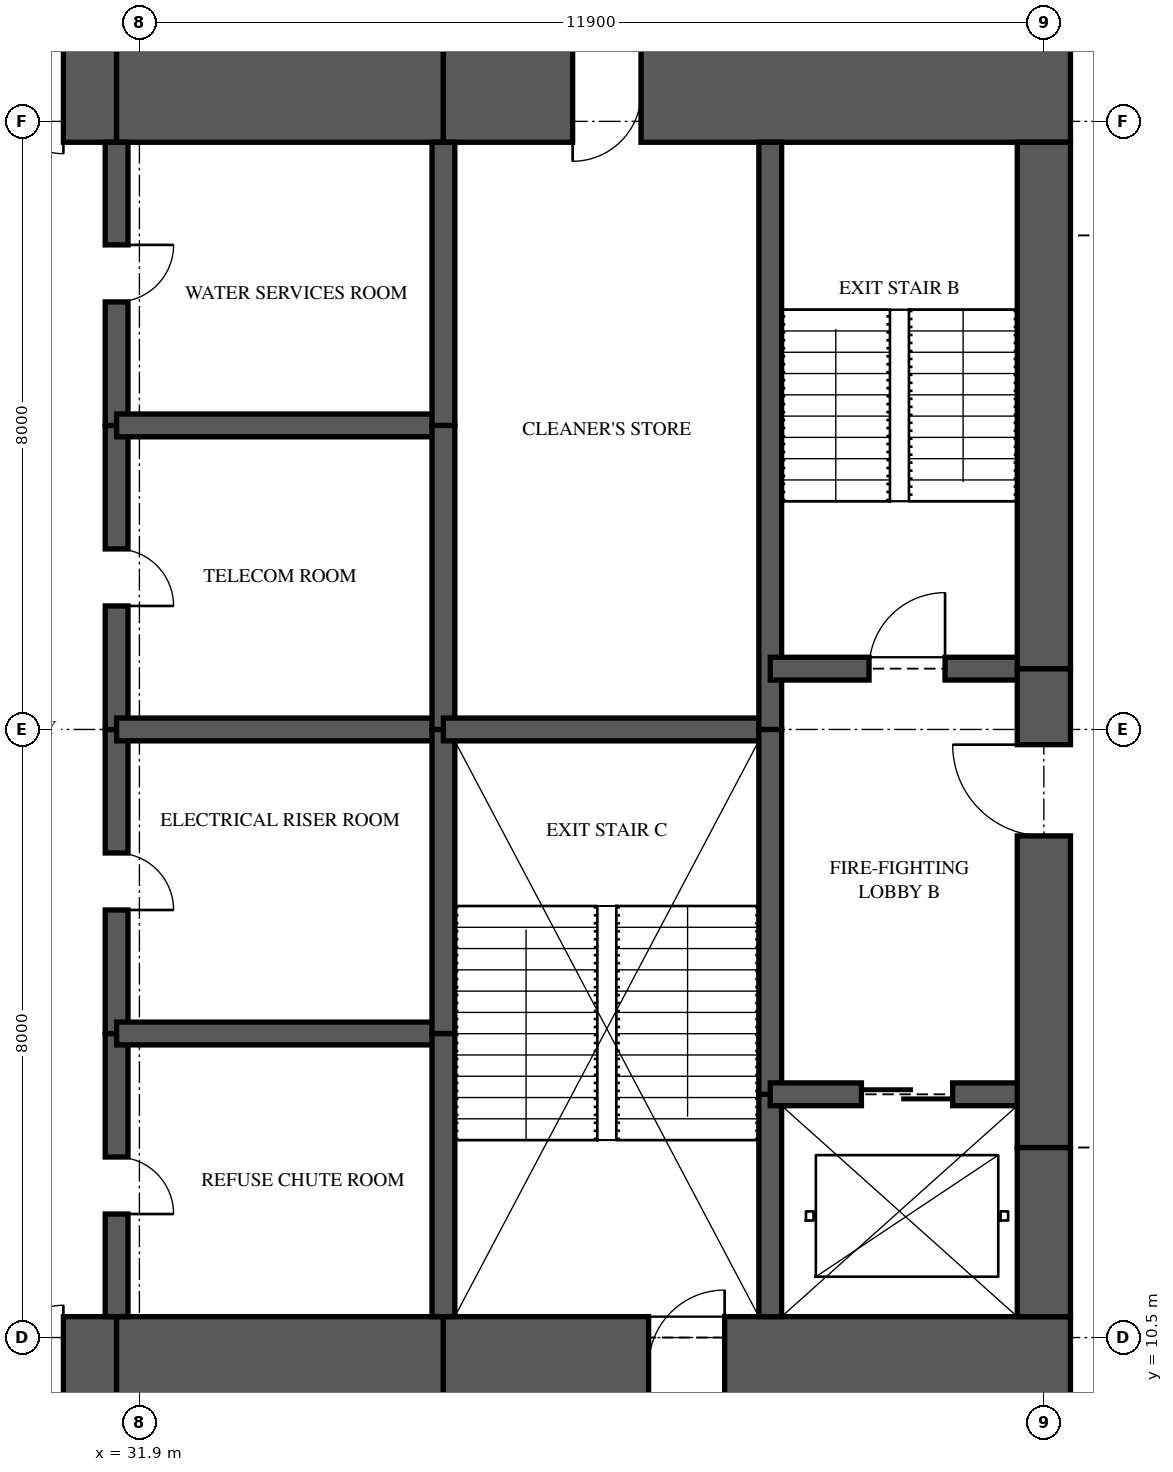
"""IFC4 building model, lengths in metres.
Left out: names, types, materials, properties, quantities, classifications, styles, units other than length and angle.
Written with IfcOpenShell. Run it as: python <this file> out.ifc"""

import sys

from ifc_helpers import new_model, si_unit, direction, frame, frame_2d, origin, place, context, subcontext, project, spatial, rectangle, extrude, element, fill, save


model = new_model("IFC4")
c1 = context("Model", 3, precision=1e-05, world=origin(), true_north=direction((0.0, 1.0)))
c2 = subcontext(c1, "Body", "Model", "MODEL_VIEW")
j1 = project(units=[si_unit("LENGTHUNIT", "METRE"), si_unit("PLANEANGLEUNIT", "RADIAN")], contexts=[c1])
p1 = place(None, origin())
s1 = spatial("IfcSite", under=j1, at=p1, CompositionType="ELEMENT")
p2 = place(p1, origin())
s2 = spatial("IfcBuilding", under=s1, at=p2, CompositionType="ELEMENT")
p3 = place(p2, frame((0.0, 0.0, 174.45)))
s3 = spatial("IfcBuildingStorey", under=s2, at=p3, CompositionType="ELEMENT", Elevation=174.45)
p4 = place(p3, frame((26.0, 10.125, 0.0), z_axis=(0.0, 0.0, 1.0), x_axis=(1.0, 0.0, 0.0)))
e1 = element("IfcWall", 1, at=p4, inside=s3, PredefinedType="SHEAR", context=c2, shape_type="SweptSolid", body=[
    extrude(rectangle(XDim=5.6, YDim=1.3, at=frame_2d((2.8, 0.0))), origin(), (0.0, 0.0, 1.0), 3.35),
])
p5 = place(p4, frame((3.3, 0.0, 0.0)))
e2 = element("IfcOpeningElement", 2, at=p5, cuts=e1, PredefinedType="OPENING", context=c2, shape_type="SweptSolid", body=[
    extrude(rectangle(XDim=1.6, YDim=2.1, at=frame_2d((0.8, 1.05))), frame((0.0, 0.66, 0.0), z_axis=(0.0, -1.0, 0.0), x_axis=(1.0, 0.0, 0.0)), (0.0, 0.0, 1.0), 1.32),
])
p6 = place(p3, frame((31.6, 10.125, 0.0), z_axis=(0.0, 0.0, 1.0), x_axis=(1.0, 0.0, 0.0)))
e3 = element("IfcWall", 3, at=p6, inside=s3, PredefinedType="SHEAR", context=c2, shape_type="SweptSolid", body=[
    extrude(rectangle(XDim=4.3, YDim=1.3, at=frame_2d((2.15, 0.0))), origin(), (0.0, 0.0, 1.0), 3.35),
])
p7 = place(p3, frame((35.9, 10.125, 0.0), z_axis=(0.0, 0.0, 1.0), x_axis=(1.0, 0.0, 0.0)))
e4 = element("IfcWall", 4, at=p7, inside=s3, PredefinedType="SHEAR", context=c2, shape_type="SweptSolid", body=[
    extrude(rectangle(XDim=8.25, YDim=1.3, at=frame_2d((4.125, 0.0))), origin(), (0.0, 0.0, 1.0), 3.35),
])
p8 = place(p7, frame((2.7, 0.0, 0.0)))
e5 = element("IfcOpeningElement", 5, at=p8, cuts=e4, PredefinedType="OPENING", context=c2, shape_type="SweptSolid", body=[
    extrude(rectangle(XDim=1.0, YDim=2.1, at=frame_2d((0.5, 1.05))), frame((0.0, 0.66, 0.0), z_axis=(0.0, -1.0, 0.0), x_axis=(1.0, 0.0, 0.0)), (0.0, 0.0, 1.0), 1.32),
])
p9 = place(p3, frame((44.15, 26.875, 0.0), z_axis=(0.0, 0.0, 1.0), x_axis=(-1.0, 0.0, 0.0)))
e6 = element("IfcWall", 6, at=p9, inside=s3, PredefinedType="SHEAR", context=c2, shape_type="SweptSolid", body=[
    extrude(rectangle(XDim=8.25, YDim=1.3, at=frame_2d((4.125, 0.0))), origin(), (0.0, 0.0, 1.0), 3.35),
])
p10 = place(p9, frame((5.65, 0.0, 0.0)))
e7 = element("IfcOpeningElement", 7, at=p10, cuts=e6, PredefinedType="OPENING", context=c2, shape_type="SweptSolid", body=[
    extrude(rectangle(XDim=0.9, YDim=2.1, at=frame_2d((0.45, 1.05))), frame((0.0, 0.66, 0.0), z_axis=(0.0, -1.0, 0.0), x_axis=(1.0, 0.0, 0.0)), (0.0, 0.0, 1.0), 1.32),
])
p11 = place(p3, frame((35.9, 26.875, 0.0), z_axis=(0.0, 0.0, 1.0), x_axis=(-1.0, 0.0, 0.0)))
e8 = element("IfcWall", 8, at=p11, inside=s3, PredefinedType="SHEAR", context=c2, shape_type="SweptSolid", body=[
    extrude(rectangle(XDim=4.3, YDim=1.3, at=frame_2d((2.15, 0.0))), origin(), (0.0, 0.0, 1.0), 3.35),
])
p12 = place(p3, frame((31.6, 26.875, 0.0), z_axis=(0.0, 0.0, 1.0), x_axis=(-1.0, 0.0, 0.0)))
e9 = element("IfcWall", 9, at=p12, inside=s3, PredefinedType="SHEAR", context=c2, shape_type="SweptSolid", body=[
    extrude(rectangle(XDim=5.6, YDim=1.3, at=frame_2d((2.8, 0.0))), origin(), (0.0, 0.0, 1.0), 3.35),
])
p13 = place(p12, frame((0.7, 0.0, 0.0)))
e10 = element("IfcOpeningElement", 10, at=p13, cuts=e9, PredefinedType="OPENING", context=c2, shape_type="SweptSolid", body=[
    extrude(rectangle(XDim=1.6, YDim=2.1, at=frame_2d((0.8, 1.05))), frame((0.0, 0.66, 0.0), z_axis=(0.0, -1.0, 0.0), x_axis=(1.0, 0.0, 0.0)), (0.0, 0.0, 1.0), 1.32),
])
p14 = place(p3, frame((43.8, 10.775, 0.0), z_axis=(0.0, 0.0, 1.0), x_axis=(0.0, 1.0, 0.0)))
e11 = element("IfcWall", 11, at=p14, inside=s3, PredefinedType="SHEAR", context=c2, shape_type="SweptSolid", body=[
    extrude(rectangle(XDim=2.225, YDim=0.7, at=frame_2d((1.113, 0.0))), origin(), (0.0, 0.0, 1.0), 3.35),
])
p15 = place(p3, frame((43.8, 13.0, 0.0), z_axis=(0.0, 0.0, 1.0), x_axis=(0.0, 1.0, 0.0)))
e12 = element("IfcWall", 12, at=p15, inside=s3, PredefinedType="SHEAR", context=c2, shape_type="SweptSolid", body=[
    extrude(rectangle(XDim=6.3, YDim=0.7, at=frame_2d((3.15, 0.0))), origin(), (0.0, 0.0, 1.0), 3.35),
])
p16 = place(p15, frame((4.1, 0.0, 0.0)))
e13 = element("IfcOpeningElement", 13, at=p16, cuts=e12, PredefinedType="OPENING", context=c2, shape_type="SweptSolid", body=[
    extrude(rectangle(XDim=1.2, YDim=2.2, at=frame_2d((0.6, 1.1))), frame((0.0, 0.36, 0.0), z_axis=(0.0, -1.0, 0.0), x_axis=(1.0, 0.0, 0.0)), (0.0, 0.0, 1.0), 0.72),
])
p17 = place(p3, frame((43.8, 19.3, 0.0), z_axis=(0.0, 0.0, 1.0), x_axis=(0.0, 1.0, 0.0)))
e14 = element("IfcWall", 14, at=p17, inside=s3, PredefinedType="SHEAR", context=c2, shape_type="SweptSolid", body=[
    extrude(rectangle(XDim=6.925, YDim=0.7, at=frame_2d((3.462, 0.0))), origin(), (0.0, 0.0, 1.0), 3.35),
])
p18 = place(p3, frame((31.6, 10.775, 0.0), z_axis=(0.0, 0.0, 1.0), x_axis=(0.0, 1.0, 0.0)))
e15 = element("IfcWall", 15, at=p18, inside=s3, PredefinedType="SHEAR", context=c2, shape_type="SweptSolid", body=[
    extrude(rectangle(XDim=3.725, YDim=0.3, at=frame_2d((1.863, 0.0))), origin(), (0.0, 0.0, 1.0), 3.35),
])
p19 = place(p18, frame((1.35, 0.0, 0.0)))
e16 = element("IfcOpeningElement", 16, at=p19, cuts=e15, PredefinedType="OPENING", context=c2, shape_type="SweptSolid", body=[
    extrude(rectangle(XDim=0.75, YDim=2.1, at=frame_2d((0.375, 1.05))), frame((0.0, 0.16, 0.0), z_axis=(0.0, -1.0, 0.0), x_axis=(1.0, 0.0, 0.0)), (0.0, 0.0, 1.0), 0.32),
])
p20 = place(p3, frame((31.6, 14.5, 0.0), z_axis=(0.0, 0.0, 1.0), x_axis=(0.0, 1.0, 0.0)))
e17 = element("IfcWall", 17, at=p20, inside=s3, PredefinedType="SHEAR", context=c2, shape_type="SweptSolid", body=[
    extrude(rectangle(XDim=4.0, YDim=0.3, at=frame_2d((2.0, 0.0))), origin(), (0.0, 0.0, 1.0), 3.35),
])
p21 = place(p20, frame((1.625, 0.0, 0.0)))
e18 = element("IfcOpeningElement", 18, at=p21, cuts=e17, PredefinedType="OPENING", context=c2, shape_type="SweptSolid", body=[
    extrude(rectangle(XDim=0.75, YDim=2.1, at=frame_2d((0.375, 1.05))), frame((0.0, 0.16, 0.0), z_axis=(0.0, -1.0, 0.0), x_axis=(1.0, 0.0, 0.0)), (0.0, 0.0, 1.0), 0.32),
])
p22 = place(p3, frame((31.6, 18.5, 0.0), z_axis=(0.0, 0.0, 1.0), x_axis=(0.0, 1.0, 0.0)))
e19 = element("IfcWall", 19, at=p22, inside=s3, PredefinedType="SHEAR", context=c2, shape_type="SweptSolid", body=[
    extrude(rectangle(XDim=4.0, YDim=0.3, at=frame_2d((2.0, 0.0))), origin(), (0.0, 0.0, 1.0), 3.35),
])
p23 = place(p22, frame((1.625, 0.0, 0.0)))
e20 = element("IfcOpeningElement", 20, at=p23, cuts=e19, PredefinedType="OPENING", context=c2, shape_type="SweptSolid", body=[
    extrude(rectangle(XDim=0.75, YDim=2.1, at=frame_2d((0.375, 1.05))), frame((0.0, 0.16, 0.0), z_axis=(0.0, -1.0, 0.0), x_axis=(1.0, 0.0, 0.0)), (0.0, 0.0, 1.0), 0.32),
])
p24 = place(p3, frame((31.6, 22.5, 0.0), z_axis=(0.0, 0.0, 1.0), x_axis=(0.0, 1.0, 0.0)))
e21 = element("IfcWall", 21, at=p24, inside=s3, PredefinedType="SHEAR", context=c2, shape_type="SweptSolid", body=[
    extrude(rectangle(XDim=3.725, YDim=0.3, at=frame_2d((1.863, 0.0))), origin(), (0.0, 0.0, 1.0), 3.35),
])
p25 = place(p24, frame((1.625, 0.0, 0.0)))
e22 = element("IfcOpeningElement", 22, at=p25, cuts=e21, PredefinedType="OPENING", context=c2, shape_type="SweptSolid", body=[
    extrude(rectangle(XDim=0.75, YDim=2.1, at=frame_2d((0.375, 1.05))), frame((0.0, 0.16, 0.0), z_axis=(0.0, -1.0, 0.0), x_axis=(1.0, 0.0, 0.0)), (0.0, 0.0, 1.0), 0.32),
])
p26 = place(p3, frame((35.9, 10.775, 0.0), z_axis=(0.0, 0.0, 1.0), x_axis=(0.0, 1.0, 0.0)))
e23 = element("IfcWall", 23, at=p26, inside=s3, PredefinedType="SHEAR", context=c2, shape_type="SweptSolid", body=[
    extrude(rectangle(XDim=3.725, YDim=0.3, at=frame_2d((1.863, 0.0))), origin(), (0.0, 0.0, 1.0), 3.35),
])
for number, where, z_axis, x_axis in (
    (24, (35.9, 14.5, 0.0), (0.0, 0.0, 1.0), (0.0, 1.0, 0.0)),
    (25, (35.9, 18.5, 0.0), (0.0, 0.0, 1.0), (0.0, 1.0, 0.0)),
):
    element("IfcWall", number, at=place(p3, frame(where, z_axis=z_axis, x_axis=x_axis)), inside=s3, PredefinedType="SHEAR", context=c2, shape_type="SweptSolid", body=[
        extrude(rectangle(XDim=4.0, YDim=0.3, at=frame_2d((2.0, 0.0))), origin(), (0.0, 0.0, 1.0), 3.35),
    ])
p27 = place(p3, frame((35.9, 22.5, 0.0), z_axis=(0.0, 0.0, 1.0), x_axis=(0.0, 1.0, 0.0)))
e26 = element("IfcWall", 26, at=p27, inside=s3, PredefinedType="SHEAR", context=c2, shape_type="SweptSolid", body=[
    extrude(rectangle(XDim=3.725, YDim=0.3, at=frame_2d((1.863, 0.0))), origin(), (0.0, 0.0, 1.0), 3.35),
])
p28 = place(p3, frame((40.2, 10.775, 0.0), z_axis=(0.0, 0.0, 1.0), x_axis=(0.0, 1.0, 0.0)))
e27 = element("IfcWall", 27, at=p28, inside=s3, PredefinedType="SHEAR", context=c2, shape_type="SweptSolid", body=[
    extrude(rectangle(XDim=2.925, YDim=0.3, at=frame_2d((1.462, 0.0))), origin(), (0.0, 0.0, 1.0), 3.35),
])
p29 = place(p3, frame((40.2, 13.7, 0.0), z_axis=(0.0, 0.0, 1.0), x_axis=(0.0, 1.0, 0.0)))
e28 = element("IfcWall", 28, at=p29, inside=s3, PredefinedType="SHEAR", context=c2, shape_type="SweptSolid", body=[
    extrude(rectangle(XDim=4.8, YDim=0.3, at=frame_2d((2.4, 0.0))), origin(), (0.0, 0.0, 1.0), 3.35),
])
p30 = place(p3, frame((40.2, 18.5, 0.0), z_axis=(0.0, 0.0, 1.0), x_axis=(0.0, 1.0, 0.0)))
e29 = element("IfcWall", 29, at=p30, inside=s3, PredefinedType="SHEAR", context=c2, shape_type="SweptSolid", body=[
    extrude(rectangle(XDim=7.725, YDim=0.3, at=frame_2d((3.863, 0.0))), origin(), (0.0, 0.0, 1.0), 3.35),
])
for number, where, z_axis, x_axis in (
    (30, (31.6, 14.5, 0.0), (0.0, 0.0, 1.0), (1.0, 0.0, 0.0)),
    (31, (31.6, 18.5, 0.0), (0.0, 0.0, 1.0), (1.0, 0.0, 0.0)),
    (32, (31.6, 22.5, 0.0), (0.0, 0.0, 1.0), (1.0, 0.0, 0.0)),
):
    element("IfcWall", number, at=place(p3, frame(where, z_axis=z_axis, x_axis=x_axis)), inside=s3, PredefinedType="SHEAR", context=c2, shape_type="SweptSolid", body=[
        extrude(rectangle(XDim=4.3, YDim=0.3, at=frame_2d((2.15, 0.0))), origin(), (0.0, 0.0, 1.0), 3.35),
    ])
p31 = place(p3, frame((35.9, 18.5, 0.0), z_axis=(0.0, 0.0, 1.0), x_axis=(1.0, 0.0, 0.0)))
e33 = element("IfcWall", 33, at=p31, inside=s3, PredefinedType="SHEAR", context=c2, shape_type="SweptSolid", body=[
    extrude(rectangle(XDim=4.3, YDim=0.3, at=frame_2d((2.15, 0.0))), origin(), (0.0, 0.0, 1.0), 3.35),
])
p32 = place(p3, frame((40.2, 13.7, 0.0), z_axis=(0.0, 0.0, 1.0), x_axis=(1.0, 0.0, 0.0)))
e34 = element("IfcWall", 34, at=p32, inside=s3, PredefinedType="SHEAR", context=c2, shape_type="SweptSolid", body=[
    extrude(rectangle(XDim=3.6, YDim=0.3, at=frame_2d((1.8, 0.0))), origin(), (0.0, 0.0, 1.0), 3.35),
])
p33 = place(p32, frame((1.2, 0.0, 0.0)))
e35 = element("IfcOpeningElement", 35, at=p33, cuts=e34, PredefinedType="OPENING", context=c2, shape_type="SweptSolid", body=[
    extrude(rectangle(XDim=1.2, YDim=2.1, at=frame_2d((0.6, 1.05))), frame((0.0, 0.16, 0.0), z_axis=(0.0, -1.0, 0.0), x_axis=(1.0, 0.0, 0.0)), (0.0, 0.0, 1.0), 0.32),
])
p34 = place(p3, frame((40.2, 19.3, 0.0), z_axis=(0.0, 0.0, 1.0), x_axis=(1.0, 0.0, 0.0)))
e36 = element("IfcWall", 36, at=p34, inside=s3, PredefinedType="SHEAR", context=c2, shape_type="SweptSolid", body=[
    extrude(rectangle(XDim=3.6, YDim=0.3, at=frame_2d((1.8, 0.0))), origin(), (0.0, 0.0, 1.0), 3.35),
])
p35 = place(p34, frame((1.3, 0.0, 0.0)))
e37 = element("IfcOpeningElement", 37, at=p35, cuts=e36, PredefinedType="OPENING", context=c2, shape_type="SweptSolid", body=[
    extrude(rectangle(XDim=1.0, YDim=2.1, at=frame_2d((0.5, 1.05))), frame((0.0, 0.16, 0.0), z_axis=(0.0, -1.0, 0.0), x_axis=(1.0, 0.0, 0.0)), (0.0, 0.0, 1.0), 0.32),
])
p36 = place(p35, origin())
e38 = element("IfcDoor", 38, at=p36, inside=s3, OperationType="SINGLE_SWING_RIGHT", PredefinedType="DOOR", context=c2, shape_type="SweptSolid", body=[
    extrude(rectangle(XDim=1.0, YDim=2.1, at=frame_2d((0.5, 1.05))), frame((0.0, 0.025, 0.0), z_axis=(0.0, -1.0, 0.0), x_axis=(1.0, 0.0, 0.0)), (0.0, 0.0, 1.0), 0.05),
])
fill(e37, e38)
p37 = place(p16, origin())
e39 = element("IfcDoor", 39, at=p37, inside=s3, OperationType="SINGLE_SWING_RIGHT", PredefinedType="DOOR", context=c2, shape_type="SweptSolid", body=[
    extrude(rectangle(XDim=1.2, YDim=2.2, at=frame_2d((0.6, 1.1))), frame((0.0, 0.025, 0.0), z_axis=(0.0, -1.0, 0.0), x_axis=(1.0, 0.0, 0.0)), (0.0, 0.0, 1.0), 0.05),
])
fill(e13, e39)
p38 = place(p33, origin())
e40 = element("IfcDoor", 40, at=p38, inside=s3, OperationType="SLIDING_TO_LEFT", PredefinedType="DOOR", context=c2, shape_type="SweptSolid", body=[
    extrude(rectangle(XDim=1.2, YDim=2.1, at=frame_2d((0.6, 1.05))), frame((0.0, 0.025, 0.0), z_axis=(0.0, -1.0, 0.0), x_axis=(1.0, 0.0, 0.0)), (0.0, 0.0, 1.0), 0.05),
])
fill(e35, e40)
p39 = place(p5, origin())
e41 = element("IfcDoor", 41, at=p39, inside=s3, OperationType="DOUBLE_DOOR_SINGLE_SWING", PredefinedType="DOOR", context=c2, shape_type="SweptSolid", body=[
    extrude(rectangle(XDim=1.6, YDim=2.1, at=frame_2d((0.8, 1.05))), frame((0.0, 0.025, 0.0), z_axis=(0.0, -1.0, 0.0), x_axis=(1.0, 0.0, 0.0)), (0.0, 0.0, 1.0), 0.05),
])
fill(e2, e41)
p40 = place(p13, origin())
e42 = element("IfcDoor", 42, at=p40, inside=s3, OperationType="DOUBLE_DOOR_SINGLE_SWING", PredefinedType="DOOR", context=c2, shape_type="SweptSolid", body=[
    extrude(rectangle(XDim=1.6, YDim=2.1, at=frame_2d((0.8, 1.05))), frame((0.0, 0.025, 0.0), z_axis=(0.0, -1.0, 0.0), x_axis=(1.0, 0.0, 0.0)), (0.0, 0.0, 1.0), 0.05),
])
fill(e10, e42)
p41 = place(p19, frame((0.75, 0.0, 0.0), z_axis=(0.0, 0.0, 1.0), x_axis=(-1.0, 0.0, 0.0)))
e43 = element("IfcDoor", 43, at=p41, inside=s3, OperationType="SINGLE_SWING_RIGHT", PredefinedType="DOOR", context=c2, shape_type="SweptSolid", body=[
    extrude(rectangle(XDim=0.75, YDim=2.1, at=frame_2d((0.375, 1.05))), frame((0.0, 0.025, 0.0), z_axis=(0.0, -1.0, 0.0), x_axis=(1.0, 0.0, 0.0)), (0.0, 0.0, 1.0), 0.05),
])
fill(e16, e43)
p42 = place(p21, frame((0.75, 0.0, 0.0), z_axis=(0.0, 0.0, 1.0), x_axis=(-1.0, 0.0, 0.0)))
e44 = element("IfcDoor", 44, at=p42, inside=s3, OperationType="SINGLE_SWING_RIGHT", PredefinedType="DOOR", context=c2, shape_type="SweptSolid", body=[
    extrude(rectangle(XDim=0.75, YDim=2.1, at=frame_2d((0.375, 1.05))), frame((0.0, 0.025, 0.0), z_axis=(0.0, -1.0, 0.0), x_axis=(1.0, 0.0, 0.0)), (0.0, 0.0, 1.0), 0.05),
])
fill(e18, e44)
p43 = place(p23, frame((0.75, 0.0, 0.0), z_axis=(0.0, 0.0, 1.0), x_axis=(-1.0, 0.0, 0.0)))
e45 = element("IfcDoor", 45, at=p43, inside=s3, OperationType="SINGLE_SWING_RIGHT", PredefinedType="DOOR", context=c2, shape_type="SweptSolid", body=[
    extrude(rectangle(XDim=0.75, YDim=2.1, at=frame_2d((0.375, 1.05))), frame((0.0, 0.025, 0.0), z_axis=(0.0, -1.0, 0.0), x_axis=(1.0, 0.0, 0.0)), (0.0, 0.0, 1.0), 0.05),
])
fill(e20, e45)
p44 = place(p25, frame((0.75, 0.0, 0.0), z_axis=(0.0, 0.0, 1.0), x_axis=(-1.0, 0.0, 0.0)))
e46 = element("IfcDoor", 46, at=p44, inside=s3, OperationType="SINGLE_SWING_LEFT", PredefinedType="DOOR", context=c2, shape_type="SweptSolid", body=[
    extrude(rectangle(XDim=0.75, YDim=2.1, at=frame_2d((0.375, 1.05))), frame((0.0, 0.025, 0.0), z_axis=(0.0, -1.0, 0.0), x_axis=(1.0, 0.0, 0.0)), (0.0, 0.0, 1.0), 0.05),
])
fill(e22, e46)
p45 = place(p8, origin())
e47 = element("IfcDoor", 47, at=p45, inside=s3, OperationType="SINGLE_SWING_RIGHT", PredefinedType="DOOR", context=c2, shape_type="SweptSolid", body=[
    extrude(rectangle(XDim=1.0, YDim=2.1, at=frame_2d((0.5, 1.05))), frame((0.0, 0.025, 0.0), z_axis=(0.0, -1.0, 0.0), x_axis=(1.0, 0.0, 0.0)), (0.0, 0.0, 1.0), 0.05),
])
fill(e5, e47)
p46 = place(p10, origin())
e48 = element("IfcDoor", 48, at=p46, inside=s3, OperationType="SINGLE_SWING_RIGHT", PredefinedType="DOOR", context=c2, shape_type="SweptSolid", body=[
    extrude(rectangle(XDim=0.9, YDim=2.1, at=frame_2d((0.45, 1.05))), frame((0.0, 0.47, 0.0), z_axis=(0.0, -1.0, 0.0), x_axis=(1.0, 0.0, 0.0)), (0.0, 0.0, 1.0), 0.8),
])
fill(e7, e48)
save(model, sys.argv[1])
